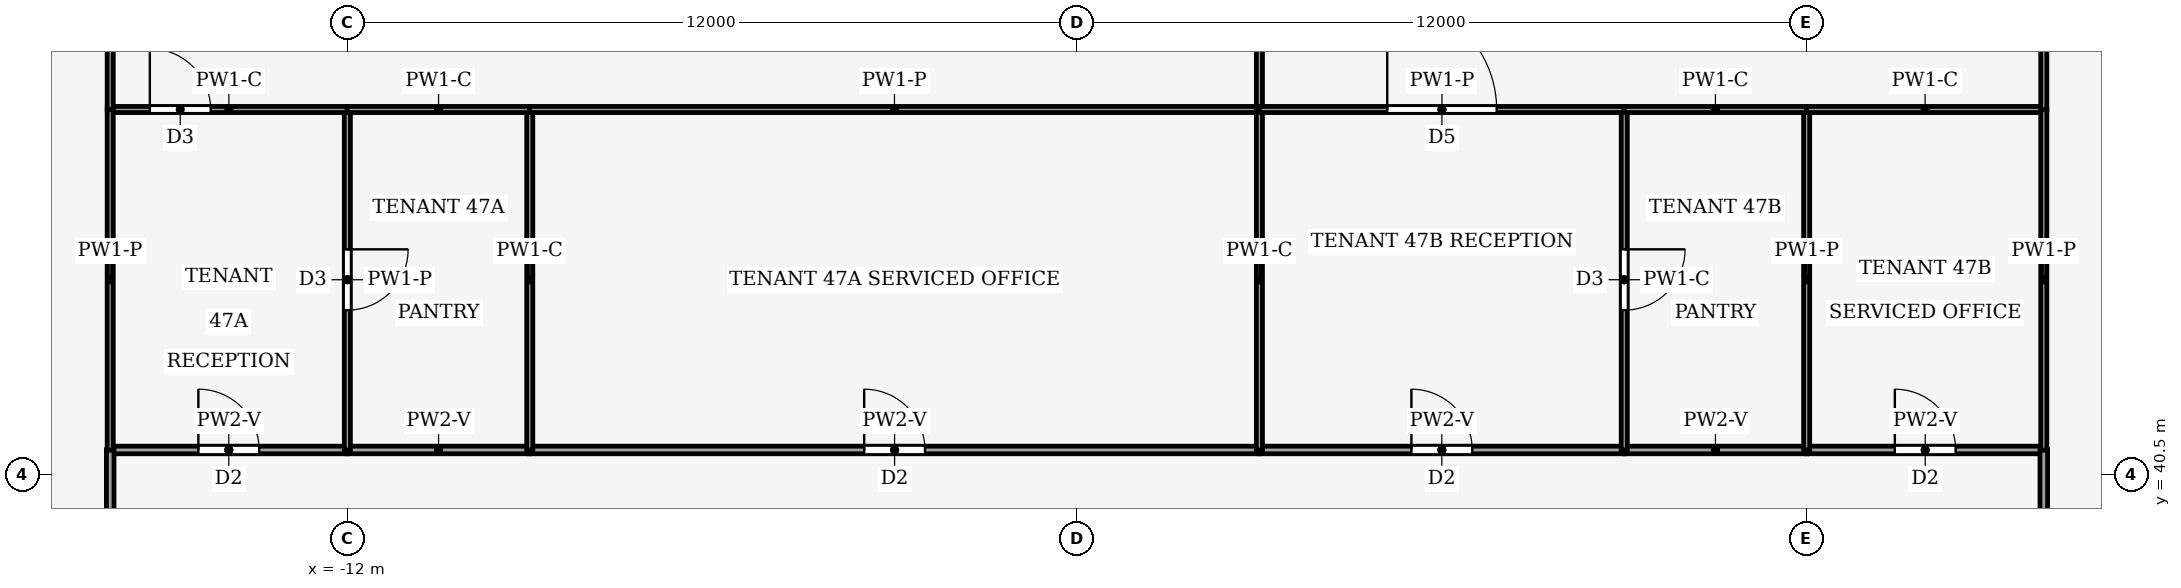
"""IFC4 building model, lengths in metres.
Left out: names, types, materials, properties, quantities, classifications, styles, units other than length and angle.
Written with IfcOpenShell. Run it as: python <this file> out.ifc"""

import sys

from ifc_helpers import new_model, si_unit, direction, frame, frame_2d, origin, place, context, subcontext, project, spatial, rectangle, extrude, element, fill, save


model = new_model("IFC4")
c1 = context("Model", 3, precision=1e-05, world=origin(), true_north=direction((0.0, 1.0)))
c2 = subcontext(c1, "Body", "Model", "MODEL_VIEW")
j1 = project(units=[si_unit("LENGTHUNIT", "METRE"), si_unit("PLANEANGLEUNIT", "RADIAN")], contexts=[c1])
p1 = place(None, origin())
s1 = spatial("IfcSite", under=j1, at=p1, CompositionType="ELEMENT")
p2 = place(p1, origin())
s2 = spatial("IfcBuilding", under=s1, at=p2, CompositionType="ELEMENT")
p3 = place(p2, frame((0.0, 0.0, 206.0)))
s3 = spatial("IfcBuildingStorey", under=s2, at=p3, CompositionType="ELEMENT", Elevation=206.0)
p4 = place(p3, frame((-15.9, 40.9, 0.0), z_axis=(0.0, 0.0, 1.0), x_axis=(1.0, 0.0, 0.0)))
e1 = element("IfcWall", 1, at=p4, inside=s3, PredefinedType="PARTITIONING", context=c2, shape_type="SweptSolid", body=[
    extrude(rectangle(XDim=3.9, YDim=0.125, at=frame_2d((1.95, 0.0))), origin(), (0.0, 0.0, 1.0), 3.44),
])
p5 = place(p4, frame((1.45, 0.0, 0.0)))
e2 = element("IfcOpeningElement", 2, at=p5, cuts=e1, PredefinedType="OPENING", context=c2, shape_type="SweptSolid", body=[
    extrude(rectangle(XDim=1.0, YDim=2.1, at=frame_2d((0.5, 1.05))), frame((0.0, 0.073, 0.0), z_axis=(0.0, -1.0, 0.0), x_axis=(1.0, 0.0, 0.0)), (0.0, 0.0, 1.0), 0.145),
])
p6 = place(p3, frame((-9.0, 40.9, 0.0), z_axis=(0.0, 0.0, 1.0), x_axis=(-1.0, 0.0, 0.0)))
e3 = element("IfcWall", 3, at=p6, inside=s3, PredefinedType="PARTITIONING", context=c2, shape_type="SweptSolid", body=[
    extrude(rectangle(XDim=3.0, YDim=0.125, at=frame_2d((1.5, 0.0))), origin(), (0.0, 0.0, 1.0), 3.44),
])
p7 = place(p3, frame((-9.0, 40.9, 0.0), z_axis=(0.0, 0.0, 1.0), x_axis=(1.0, 0.0, 0.0)))
e4 = element("IfcWall", 4, at=p7, inside=s3, PredefinedType="PARTITIONING", context=c2, shape_type="SweptSolid", body=[
    extrude(rectangle(XDim=12.0, YDim=0.125, at=frame_2d((6.0, 0.0))), origin(), (0.0, 0.0, 1.0), 3.44),
])
p8 = place(p7, frame((5.5, 0.0, 0.0)))
e5 = element("IfcOpeningElement", 5, at=p8, cuts=e4, PredefinedType="OPENING", context=c2, shape_type="SweptSolid", body=[
    extrude(rectangle(XDim=1.0, YDim=2.1, at=frame_2d((0.5, 1.05))), frame((0.0, 0.073, 0.0), z_axis=(0.0, -1.0, 0.0), x_axis=(1.0, 0.0, 0.0)), (0.0, 0.0, 1.0), 0.145),
])
p9 = place(p3, frame((3.0, 40.9, 0.0), z_axis=(0.0, 0.0, 1.0), x_axis=(1.0, 0.0, 0.0)))
e6 = element("IfcWall", 6, at=p9, inside=s3, PredefinedType="PARTITIONING", context=c2, shape_type="SweptSolid", body=[
    extrude(rectangle(XDim=6.0, YDim=0.125, at=frame_2d((3.0, 0.0))), origin(), (0.0, 0.0, 1.0), 3.44),
])
p10 = place(p9, frame((2.5, 0.0, 0.0)))
e7 = element("IfcOpeningElement", 7, at=p10, cuts=e6, PredefinedType="OPENING", context=c2, shape_type="SweptSolid", body=[
    extrude(rectangle(XDim=1.0, YDim=2.1, at=frame_2d((0.5, 1.05))), frame((0.0, 0.073, 0.0), z_axis=(0.0, -1.0, 0.0), x_axis=(1.0, 0.0, 0.0)), (0.0, 0.0, 1.0), 0.145),
])
p11 = place(p3, frame((12.0, 40.9, 0.0), z_axis=(0.0, 0.0, 1.0), x_axis=(-1.0, 0.0, 0.0)))
e8 = element("IfcWall", 8, at=p11, inside=s3, PredefinedType="PARTITIONING", context=c2, shape_type="SweptSolid", body=[
    extrude(rectangle(XDim=3.0, YDim=0.125, at=frame_2d((1.5, 0.0))), origin(), (0.0, 0.0, 1.0), 3.44),
])
p12 = place(p3, frame((12.0, 40.9, 0.0), z_axis=(0.0, 0.0, 1.0), x_axis=(1.0, 0.0, 0.0)))
e9 = element("IfcWall", 9, at=p12, inside=s3, PredefinedType="PARTITIONING", context=c2, shape_type="SweptSolid", body=[
    extrude(rectangle(XDim=3.9, YDim=0.125, at=frame_2d((1.95, 0.0))), origin(), (0.0, 0.0, 1.0), 3.44),
])
p13 = place(p12, frame((1.45, 0.0, 0.0)))
e10 = element("IfcOpeningElement", 10, at=p13, cuts=e9, PredefinedType="OPENING", context=c2, shape_type="SweptSolid", body=[
    extrude(rectangle(XDim=1.0, YDim=2.1, at=frame_2d((0.5, 1.05))), frame((0.0, 0.073, 0.0), z_axis=(0.0, -1.0, 0.0), x_axis=(1.0, 0.0, 0.0)), (0.0, 0.0, 1.0), 0.145),
])
p14 = place(p3, frame((-15.9, 31.5, 0.0), z_axis=(0.0, 0.0, 1.0), x_axis=(0.0, 1.0, 0.0)))
e11 = element("IfcWall", 11, at=p14, inside=s3, PredefinedType="PARTITIONING", context=c2, shape_type="SweptSolid", body=[
    extrude(rectangle(XDim=9.404, YDim=0.125, at=frame_2d((4.702, 0.0))), origin(), (0.0, 0.0, 1.0), 3.14),
])
p15 = place(p14, frame((4.202, 0.0, 0.0)))
e12 = element("IfcOpeningElement", 12, at=p15, cuts=e11, PredefinedType="OPENING", context=c2, shape_type="SweptSolid", body=[
    extrude(rectangle(XDim=1.0, YDim=2.1, at=frame_2d((0.5, 1.05))), frame((0.0, 0.073, 0.0), z_axis=(0.0, -1.0, 0.0), x_axis=(1.0, 0.0, 0.0)), (0.0, 0.0, 1.0), 0.145),
])
p16 = place(p3, frame((15.9, 40.904, 0.0), z_axis=(0.0, 0.0, 1.0), x_axis=(0.0, -1.0, 0.0)))
e13 = element("IfcWall", 13, at=p16, inside=s3, PredefinedType="PARTITIONING", context=c2, shape_type="SweptSolid", body=[
    extrude(rectangle(XDim=3.404, YDim=0.125, at=frame_2d((1.702, 0.0))), origin(), (0.0, 0.0, 1.0), 3.14),
])
p17 = place(p16, frame((1.602, 0.0, 0.0)))
e14 = element("IfcOpeningElement", 14, at=p17, cuts=e13, PredefinedType="OPENING", context=c2, shape_type="SweptSolid", body=[
    extrude(rectangle(XDim=1.0, YDim=2.1, at=frame_2d((0.5, 1.05))), frame((0.0, 0.073, 0.0), z_axis=(0.0, -1.0, 0.0), x_axis=(1.0, 0.0, 0.0)), (0.0, 0.0, 1.0), 0.145),
])
p18 = place(p3, frame((-12.0, 46.5, 0.0), z_axis=(0.0, 0.0, 1.0), x_axis=(0.0, -1.0, 0.0)))
e15 = element("IfcWall", 15, at=p18, inside=s3, PredefinedType="PARTITIONING", context=c2, shape_type="SweptSolid", body=[
    extrude(rectangle(XDim=5.6, YDim=0.1, at=frame_2d((2.8, 0.0))), origin(), (0.0, 0.0, 1.0), 3.44),
])
p19 = place(p18, frame((2.3, 0.0, 0.0)))
e16 = element("IfcOpeningElement", 16, at=p19, cuts=e15, PredefinedType="OPENING", context=c2, shape_type="SweptSolid", body=[
    extrude(rectangle(XDim=1.0, YDim=2.1, at=frame_2d((0.5, 1.05))), frame((0.0, 0.06, 0.0), z_axis=(0.0, -1.0, 0.0), x_axis=(1.0, 0.0, 0.0)), (0.0, 0.0, 1.0), 0.12),
])
p20 = place(p3, frame((-15.9, 46.5, 0.0), z_axis=(0.0, 0.0, 1.0), x_axis=(1.0, 0.0, 0.0)))
e17 = element("IfcWall", 17, at=p20, inside=s3, PredefinedType="PARTITIONING", context=c2, shape_type="SweptSolid", body=[
    extrude(rectangle(XDim=3.904, YDim=0.1, at=frame_2d((1.952, 0.0))), origin(), (0.0, 0.0, 1.0), 3.87),
])
p21 = place(p20, frame((0.652, 0.0, 0.0)))
e18 = element("IfcOpeningElement", 18, at=p21, cuts=e17, PredefinedType="OPENING", context=c2, shape_type="SweptSolid", body=[
    extrude(rectangle(XDim=1.0, YDim=2.1, at=frame_2d((0.5, 1.05))), frame((0.0, 0.06, 0.0), z_axis=(0.0, -1.0, 0.0), x_axis=(1.0, 0.0, 0.0)), (0.0, 0.0, 1.0), 0.12),
])
p22 = place(p3, frame((-15.9, 46.504, 0.0), z_axis=(0.0, 0.0, 1.0), x_axis=(0.0, -1.0, 0.0)))
e19 = element("IfcWall", 19, at=p22, inside=s3, PredefinedType="PARTITIONING", context=c2, shape_type="SweptSolid", body=[
    extrude(rectangle(XDim=5.608, YDim=0.1, at=frame_2d((2.804, 0.0))), origin(), (0.0, 0.0, 1.0), 3.44),
])
p23 = place(p3, frame((-9.0, 40.9, 0.0), z_axis=(0.0, 0.0, 1.0), x_axis=(0.0, 1.0, 0.0)))
e20 = element("IfcWall", 20, at=p23, inside=s3, PredefinedType="PARTITIONING", context=c2, shape_type="SweptSolid", body=[
    extrude(rectangle(XDim=5.6, YDim=0.1, at=frame_2d((2.8, 0.0))), origin(), (0.0, 0.0, 1.0), 3.87),
])
p24 = place(p3, frame((-8.996, 46.5, 0.0), z_axis=(0.0, 0.0, 1.0), x_axis=(-1.0, 0.0, 0.0)))
e21 = element("IfcWall", 21, at=p24, inside=s3, PredefinedType="PARTITIONING", context=c2, shape_type="SweptSolid", body=[
    extrude(rectangle(XDim=3.008, YDim=0.1, at=frame_2d((1.504, 0.0))), origin(), (0.0, 0.0, 1.0), 3.87),
])
p25 = place(p3, frame((3.0, 46.5, 0.0), z_axis=(0.0, 0.0, 1.0), x_axis=(-1.0, 0.0, 0.0)))
e22 = element("IfcWall", 22, at=p25, inside=s3, PredefinedType="PARTITIONING", context=c2, shape_type="SweptSolid", body=[
    extrude(rectangle(XDim=12.004, YDim=0.1, at=frame_2d((6.002, 0.0))), origin(), (0.0, 0.0, 1.0), 3.44),
])
p26 = place(p3, frame((3.0, 40.9, 0.0), z_axis=(0.0, 0.0, 1.0), x_axis=(0.0, 1.0, 0.0)))
e23 = element("IfcWall", 23, at=p26, inside=s3, PredefinedType="PARTITIONING", context=c2, shape_type="SweptSolid", body=[
    extrude(rectangle(XDim=5.6, YDim=0.1, at=frame_2d((2.8, 0.0))), origin(), (0.0, 0.0, 1.0), 3.87),
])
p27 = place(p3, frame((3.0, 46.5, 0.0), z_axis=(0.0, 0.0, 1.0), x_axis=(0.0, 1.0, 0.0)))
e24 = element("IfcWall", 24, at=p27, inside=s3, PredefinedType="PARTITIONING", context=c2, shape_type="SweptSolid", body=[
    extrude(rectangle(XDim=15.004, YDim=0.1, at=frame_2d((7.502, 0.0))), origin(), (0.0, 0.0, 1.0), 3.24),
])
p28 = place(p3, frame((-15.9, 61.504, 0.0), z_axis=(0.0, 0.0, 1.0), x_axis=(0.0, -1.0, 0.0)))
e25 = element("IfcWall", 25, at=p28, inside=s3, PredefinedType="PARTITIONING", context=c2, shape_type="SweptSolid", body=[
    extrude(rectangle(XDim=15.008, YDim=0.1, at=frame_2d((7.504, 0.0))), origin(), (0.0, 0.0, 1.0), 3.24),
])
p29 = place(p3, frame((9.0, 46.5, 0.0), z_axis=(0.0, 0.0, 1.0), x_axis=(0.0, -1.0, 0.0)))
e26 = element("IfcWall", 26, at=p29, inside=s3, PredefinedType="PARTITIONING", context=c2, shape_type="SweptSolid", body=[
    extrude(rectangle(XDim=5.6, YDim=0.1, at=frame_2d((2.8, 0.0))), origin(), (0.0, 0.0, 1.0), 3.87),
])
p30 = place(p29, frame((2.3, 0.0, 0.0)))
e27 = element("IfcOpeningElement", 27, at=p30, cuts=e26, PredefinedType="OPENING", context=c2, shape_type="SweptSolid", body=[
    extrude(rectangle(XDim=1.0, YDim=2.1, at=frame_2d((0.5, 1.05))), frame((0.0, 0.06, 0.0), z_axis=(0.0, -1.0, 0.0), x_axis=(1.0, 0.0, 0.0)), (0.0, 0.0, 1.0), 0.12),
])
p31 = place(p3, frame((3.0, 46.5, 0.0), z_axis=(0.0, 0.0, 1.0), x_axis=(1.0, 0.0, 0.0)))
e28 = element("IfcWall", 28, at=p31, inside=s3, PredefinedType="PARTITIONING", context=c2, shape_type="SweptSolid", body=[
    extrude(rectangle(XDim=6.004, YDim=0.1, at=frame_2d((3.002, 0.0))), origin(), (0.0, 0.0, 1.0), 3.44),
])
p32 = place(p31, frame((2.102, 0.0, 0.0)))
e29 = element("IfcOpeningElement", 29, at=p32, cuts=e28, PredefinedType="OPENING", context=c2, shape_type="SweptSolid", body=[
    extrude(rectangle(XDim=1.8, YDim=2.1, at=frame_2d((0.9, 1.05))), frame((0.0, 0.06, 0.0), z_axis=(0.0, -1.0, 0.0), x_axis=(1.0, 0.0, 0.0)), (0.0, 0.0, 1.0), 0.12),
])
p33 = place(p3, frame((12.0, 40.9, 0.0), z_axis=(0.0, 0.0, 1.0), x_axis=(0.0, 1.0, 0.0)))
e30 = element("IfcWall", 30, at=p33, inside=s3, PredefinedType="PARTITIONING", context=c2, shape_type="SweptSolid", body=[
    extrude(rectangle(XDim=5.6, YDim=0.1, at=frame_2d((2.8, 0.0))), origin(), (0.0, 0.0, 1.0), 3.44),
])
p34 = place(p3, frame((12.004, 46.5, 0.0), z_axis=(0.0, 0.0, 1.0), x_axis=(-1.0, 0.0, 0.0)))
e31 = element("IfcWall", 31, at=p34, inside=s3, PredefinedType="PARTITIONING", context=c2, shape_type="SweptSolid", body=[
    extrude(rectangle(XDim=3.008, YDim=0.1, at=frame_2d((1.504, 0.0))), origin(), (0.0, 0.0, 1.0), 3.87),
])
p35 = place(p3, frame((15.9, 46.5, 0.0), z_axis=(0.0, 0.0, 1.0), x_axis=(-1.0, 0.0, 0.0)))
e32 = element("IfcWall", 32, at=p35, inside=s3, PredefinedType="PARTITIONING", context=c2, shape_type="SweptSolid", body=[
    extrude(rectangle(XDim=3.904, YDim=0.1, at=frame_2d((1.952, 0.0))), origin(), (0.0, 0.0, 1.0), 3.87),
])
p36 = place(p3, frame((15.9, 40.896, 0.0), z_axis=(0.0, 0.0, 1.0), x_axis=(0.0, 1.0, 0.0)))
e33 = element("IfcWall", 33, at=p36, inside=s3, PredefinedType="PARTITIONING", context=c2, shape_type="SweptSolid", body=[
    extrude(rectangle(XDim=5.608, YDim=0.1, at=frame_2d((2.804, 0.0))), origin(), (0.0, 0.0, 1.0), 3.44),
])
p37 = place(p3, frame((15.9, 46.496, 0.0), z_axis=(0.0, 0.0, 1.0), x_axis=(0.0, 1.0, 0.0)))
e34 = element("IfcWall", 34, at=p37, inside=s3, PredefinedType="PARTITIONING", context=c2, shape_type="SweptSolid", body=[
    extrude(rectangle(XDim=18.008, YDim=0.1, at=frame_2d((9.004, 0.0))), origin(), (0.0, 0.0, 1.0), 3.24),
])
p38 = place(p5, origin())
e35 = element("IfcDoor", 35, at=p38, inside=s3, OperationType="SINGLE_SWING_LEFT", PredefinedType="DOOR", context=c2, shape_type="SweptSolid", body=[
    extrude(rectangle(XDim=1.0, YDim=2.1, at=frame_2d((0.5, 1.05))), frame((0.0, 0.025, 0.0), z_axis=(0.0, -1.0, 0.0), x_axis=(1.0, 0.0, 0.0)), (0.0, 0.0, 1.0), 0.05),
])
fill(e2, e35)
p39 = place(p8, origin())
e36 = element("IfcDoor", 36, at=p39, inside=s3, OperationType="SINGLE_SWING_RIGHT", PredefinedType="DOOR", context=c2, shape_type="SweptSolid", body=[
    extrude(rectangle(XDim=1.0, YDim=2.1, at=frame_2d((0.5, 1.05))), frame((0.0, 0.025, 0.0), z_axis=(0.0, -1.0, 0.0), x_axis=(1.0, 0.0, 0.0)), (0.0, 0.0, 1.0), 0.05),
])
fill(e5, e36)
p40 = place(p10, origin())
e37 = element("IfcDoor", 37, at=p40, inside=s3, OperationType="SINGLE_SWING_LEFT", PredefinedType="DOOR", context=c2, shape_type="SweptSolid", body=[
    extrude(rectangle(XDim=1.0, YDim=2.1, at=frame_2d((0.5, 1.05))), frame((0.0, 0.025, 0.0), z_axis=(0.0, -1.0, 0.0), x_axis=(1.0, 0.0, 0.0)), (0.0, 0.0, 1.0), 0.05),
])
fill(e7, e37)
p41 = place(p13, origin())
e38 = element("IfcDoor", 38, at=p41, inside=s3, OperationType="SINGLE_SWING_RIGHT", PredefinedType="DOOR", context=c2, shape_type="SweptSolid", body=[
    extrude(rectangle(XDim=1.0, YDim=2.1, at=frame_2d((0.5, 1.05))), frame((0.0, 0.025, 0.0), z_axis=(0.0, -1.0, 0.0), x_axis=(1.0, 0.0, 0.0)), (0.0, 0.0, 1.0), 0.05),
])
fill(e10, e38)
p42 = place(p19, origin())
e39 = element("IfcDoor", 39, at=p42, inside=s3, OperationType="SINGLE_SWING_RIGHT", PredefinedType="DOOR", context=c2, shape_type="SweptSolid", body=[
    extrude(rectangle(XDim=1.0, YDim=2.1, at=frame_2d((0.5, 1.05))), frame((0.0, 0.025, 0.0), z_axis=(0.0, -1.0, 0.0), x_axis=(1.0, 0.0, 0.0)), (0.0, 0.0, 1.0), 0.05),
])
fill(e16, e39)
p43 = place(p21, origin())
e40 = element("IfcDoor", 40, at=p43, inside=s3, OperationType="SINGLE_SWING_LEFT", PredefinedType="DOOR", context=c2, shape_type="SweptSolid", body=[
    extrude(rectangle(XDim=1.0, YDim=2.1, at=frame_2d((0.5, 1.05))), frame((0.0, 0.025, 0.0), z_axis=(0.0, -1.0, 0.0), x_axis=(1.0, 0.0, 0.0)), (0.0, 0.0, 1.0), 0.05),
])
fill(e18, e40)
p44 = place(p30, origin())
e41 = element("IfcDoor", 41, at=p44, inside=s3, OperationType="SINGLE_SWING_RIGHT", PredefinedType="DOOR", context=c2, shape_type="SweptSolid", body=[
    extrude(rectangle(XDim=1.0, YDim=2.1, at=frame_2d((0.5, 1.05))), frame((0.0, 0.025, 0.0), z_axis=(0.0, -1.0, 0.0), x_axis=(1.0, 0.0, 0.0)), (0.0, 0.0, 1.0), 0.05),
])
fill(e27, e41)
p45 = place(p32, origin())
e42 = element("IfcDoor", 42, at=p45, inside=s3, OperationType="DOUBLE_DOOR_SINGLE_SWING", PredefinedType="DOOR", context=c2, shape_type="SweptSolid", body=[
    extrude(rectangle(XDim=1.8, YDim=2.1, at=frame_2d((0.9, 1.05))), frame((0.0, 0.025, 0.0), z_axis=(0.0, -1.0, 0.0), x_axis=(1.0, 0.0, 0.0)), (0.0, 0.0, 1.0), 0.05),
])
fill(e29, e42)
save(model, sys.argv[1])
